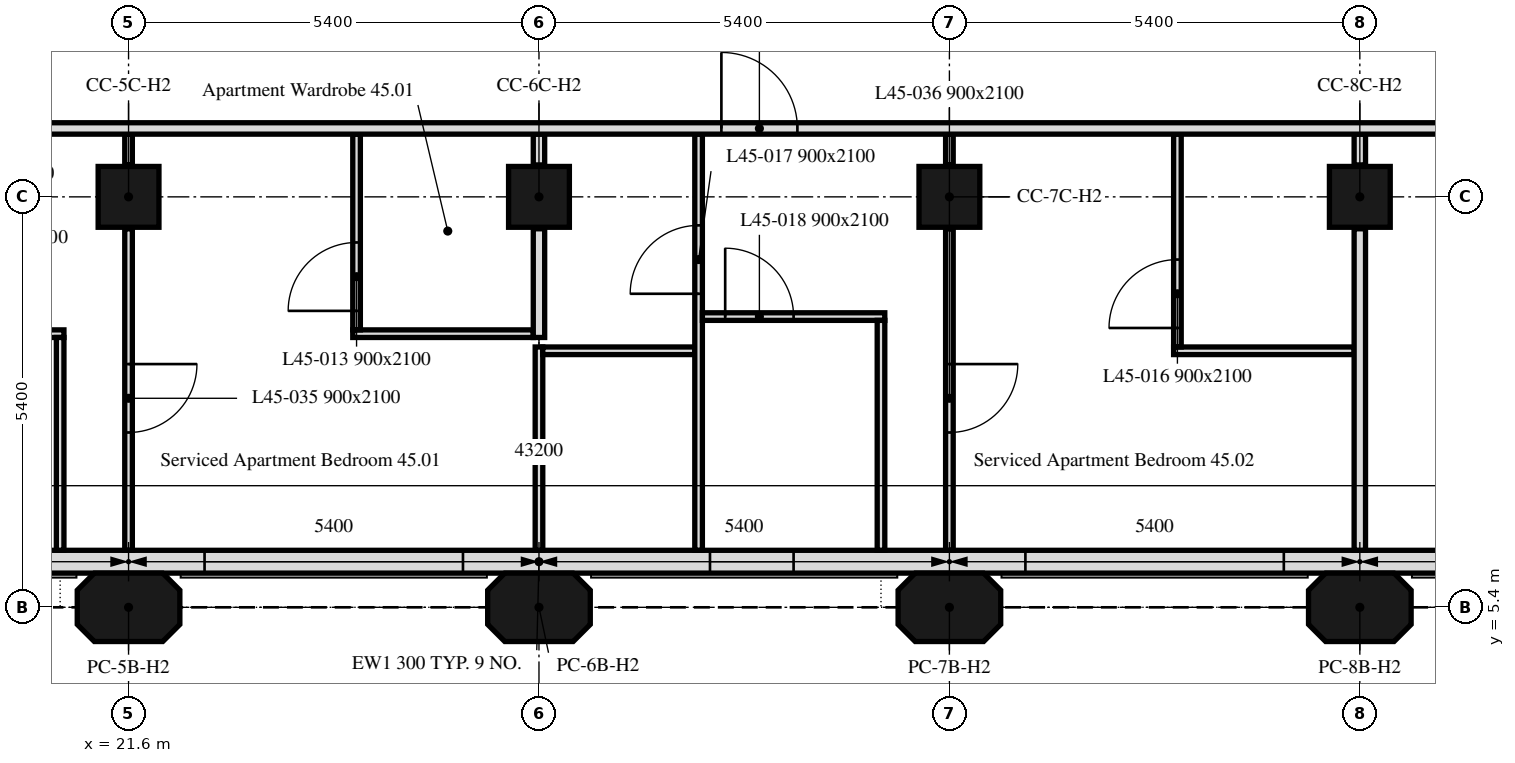
"""IFC4 building model, lengths in metres.
Left out: names, types, materials, properties, quantities, classifications, styles, units other than length and angle.
Written with IfcOpenShell. Run it as: python <this file> out.ifc"""

import sys

from ifc_helpers import new_model, si_unit, direction, frame, frame_2d, origin, origin_2d, place, context, subcontext, project, spatial, polyline, rectangle, outline, extrude, element, fill, save


model = new_model("IFC4")
c1 = context("Model", 3, precision=1e-05, world=origin(), true_north=direction((0.0, 1.0)))
c2 = subcontext(c1, "Body", "Model", "MODEL_VIEW")
j1 = project(units=[si_unit("LENGTHUNIT", "METRE"), si_unit("PLANEANGLEUNIT", "RADIAN")], contexts=[c1])
p1 = place(None, origin())
s1 = spatial("IfcSite", under=j1, at=p1, CompositionType="ELEMENT")
p2 = place(p1, origin())
s2 = spatial("IfcBuilding", under=s1, at=p2, CompositionType="ELEMENT")
p3 = place(p2, frame((0.0, 0.0, 187.3)))
s3 = spatial("IfcBuildingStorey", under=s2, at=p3, CompositionType="ELEMENT", Elevation=187.3)
for number, where, z_axis, x_axis in (
    (1, (21.6, 5.4, 0.0), (0.0, 0.0, 1.0), (1.0, 0.0, 0.0)),
    (2, (27.0, 5.4, 0.0), (0.0, 0.0, 1.0), (1.0, 0.0, 0.0)),
    (3, (32.4, 5.4, 0.0), (0.0, 0.0, 1.0), (1.0, 0.0, 0.0)),
    (4, (37.8, 5.4, 0.0), (0.0, 0.0, 1.0), (1.0, 0.0, 0.0)),
):
    element("IfcColumn", number, at=place(p3, frame(where, z_axis=z_axis, x_axis=x_axis)), inside=s3, PredefinedType="COLUMN", context=c2, shape_type="SweptSolid", body=[
        extrude(outline(polyline([(-0.45, -0.45), (0.45, -0.45), (0.675, -0.225), (0.675, 0.225), (0.45, 0.45), (-0.45, 0.45), (-0.675, 0.225), (-0.675, -0.225), (-0.45, -0.45)])), origin(), (0.0, 0.0, 1.0), 3.0),
    ])
for number, where, z_axis, x_axis in (
    (5, (21.6, 10.8, 0.0), (0.0, 0.0, 1.0), (1.0, 0.0, 0.0)),
    (6, (27.0, 10.8, 0.0), (0.0, 0.0, 1.0), (1.0, 0.0, 0.0)),
    (7, (32.4, 10.8, 0.0), (0.0, 0.0, 1.0), (1.0, 0.0, 0.0)),
    (8, (37.8, 10.8, 0.0), (0.0, 0.0, 1.0), (1.0, 0.0, 0.0)),
):
    element("IfcColumn", number, at=place(p3, frame(where, z_axis=z_axis, x_axis=x_axis)), inside=s3, PredefinedType="COLUMN", context=c2, shape_type="SweptSolid", body=[
        extrude(rectangle(XDim=0.8, YDim=0.8, at=origin_2d()), origin(), (0.0, 0.0, 1.0), 3.0),
    ])
p4 = place(p3, frame((10.986, 6.0, 0.0), z_axis=(0.0, 0.0, 1.0), x_axis=(1.0, 0.0, 0.0)))
e9 = element("IfcWall", 9, at=p4, inside=s3, PredefinedType="SOLIDWALL", context=c2, shape_type="SweptSolid", body=[
    extrude(rectangle(XDim=32.027, YDim=0.3, at=frame_2d((16.014, 0.0))), origin(), (0.0, 0.0, 1.0), 3.0),
])
p5 = place(p4, frame((0.814, 0.0, 0.9)))
e10 = element("IfcOpeningElement", 10, at=p5, cuts=e9, PredefinedType="OPENING", context=c2, shape_type="SweptSolid", body=[
    extrude(rectangle(XDim=3.4, YDim=1.7, at=frame_2d((1.7, 0.85))), frame((0.0, 0.16, 0.0), z_axis=(0.0, -1.0, 0.0), x_axis=(1.0, 0.0, 0.0)), (0.0, 0.0, 1.0), 0.32),
])
p6 = place(p4, frame((7.464, 0.0, 0.9)))
e11 = element("IfcOpeningElement", 11, at=p6, cuts=e9, PredefinedType="OPENING", context=c2, shape_type="SweptSolid", body=[
    extrude(rectangle(XDim=1.1, YDim=1.7, at=frame_2d((0.55, 0.85))), frame((0.0, 0.16, 0.0), z_axis=(0.0, -1.0, 0.0), x_axis=(1.0, 0.0, 0.0)), (0.0, 0.0, 1.0), 0.32),
])
p7 = place(p4, frame((11.614, 0.0, 0.9)))
e12 = element("IfcOpeningElement", 12, at=p7, cuts=e9, PredefinedType="OPENING", context=c2, shape_type="SweptSolid", body=[
    extrude(rectangle(XDim=3.4, YDim=1.7, at=frame_2d((1.7, 0.85))), frame((0.0, 0.16, 0.0), z_axis=(0.0, -1.0, 0.0), x_axis=(1.0, 0.0, 0.0)), (0.0, 0.0, 1.0), 0.32),
])
p8 = place(p4, frame((18.264, 0.0, 0.9)))
e13 = element("IfcOpeningElement", 13, at=p8, cuts=e9, PredefinedType="OPENING", context=c2, shape_type="SweptSolid", body=[
    extrude(rectangle(XDim=1.1, YDim=1.7, at=frame_2d((0.55, 0.85))), frame((0.0, 0.16, 0.0), z_axis=(0.0, -1.0, 0.0), x_axis=(1.0, 0.0, 0.0)), (0.0, 0.0, 1.0), 0.32),
])
p9 = place(p4, frame((22.414, 0.0, 0.9)))
e14 = element("IfcOpeningElement", 14, at=p9, cuts=e9, PredefinedType="OPENING", context=c2, shape_type="SweptSolid", body=[
    extrude(rectangle(XDim=3.4, YDim=1.7, at=frame_2d((1.7, 0.85))), frame((0.0, 0.16, 0.0), z_axis=(0.0, -1.0, 0.0), x_axis=(1.0, 0.0, 0.0)), (0.0, 0.0, 1.0), 0.32),
])
p10 = place(p4, frame((28.164, 0.0, 0.9)))
e15 = element("IfcOpeningElement", 15, at=p10, cuts=e9, PredefinedType="OPENING", context=c2, shape_type="SweptSolid", body=[
    extrude(rectangle(XDim=1.1, YDim=1.7, at=frame_2d((0.55, 0.85))), frame((0.0, 0.16, 0.0), z_axis=(0.0, -1.0, 0.0), x_axis=(1.0, 0.0, 0.0)), (0.0, 0.0, 1.0), 0.32),
])
p11 = place(p3, frame((27.0, 6.151, 0.0), z_axis=(0.0, 0.0, 1.0), x_axis=(0.0, 1.0, 0.0)))
e16 = element("IfcWall", 16, at=p11, inside=s3, PredefinedType="PARTITIONING", context=c2, shape_type="SweptSolid", body=[
    extrude(rectangle(XDim=2.674, YDim=0.1, at=frame_2d((1.337, 0.0))), origin(), (0.0, 0.0, 1.0), 3.0),
])
p12 = place(p3, frame((26.925, 9.0, 0.0), z_axis=(0.0, 0.0, 1.0), x_axis=(-1.0, 0.0, 0.0)))
e17 = element("IfcWall", 17, at=p12, inside=s3, PredefinedType="PARTITIONING", context=c2, shape_type="SweptSolid", body=[
    extrude(rectangle(XDim=2.375, YDim=0.1, at=frame_2d((1.188, 0.0))), origin(), (0.0, 0.0, 1.0), 3.0),
])
p13 = place(p3, frame((24.6, 9.05, 0.0), z_axis=(0.0, 0.0, 1.0), x_axis=(0.0, 1.0, 0.0)))
e18 = element("IfcWall", 18, at=p13, inside=s3, PredefinedType="PARTITIONING", context=c2, shape_type="SweptSolid", body=[
    extrude(rectangle(XDim=2.575, YDim=0.1, at=frame_2d((1.288, 0.0))), origin(), (0.0, 0.0, 1.0), 3.0),
])
p14 = place(p13, frame((0.25, 0.0, 0.0)))
e19 = element("IfcOpeningElement", 19, at=p14, cuts=e18, PredefinedType="OPENING", context=c2, shape_type="SweptSolid", body=[
    extrude(rectangle(XDim=0.9, YDim=2.1, at=frame_2d((0.45, 1.05))), frame((0.0, 0.05, 0.0), z_axis=(0.0, -1.0, 0.0), x_axis=(1.0, 0.0, 0.0)), (0.0, 0.0, 1.0), 0.1),
])
p15 = place(p3, frame((21.6, 11.625, 0.0), z_axis=(0.0, 0.0, 1.0), x_axis=(0.0, -1.0, 0.0)))
e20 = element("IfcWall", 20, at=p15, inside=s3, PredefinedType="PARTITIONING", context=c2, shape_type="SweptSolid", body=[
    extrude(rectangle(XDim=0.405, YDim=0.1, at=frame_2d((0.203, 0.0))), origin(), (0.0, 0.0, 1.0), 3.0),
])
p16 = place(p3, frame((21.6, 10.38, 0.0), z_axis=(0.0, 0.0, 1.0), x_axis=(0.0, -1.0, 0.0)))
e21 = element("IfcWall", 21, at=p16, inside=s3, PredefinedType="PARTITIONING", context=c2, shape_type="SweptSolid", body=[
    extrude(rectangle(XDim=4.229, YDim=0.1, at=frame_2d((2.115, 0.0))), origin(), (0.0, 0.0, 1.0), 3.0),
])
p17 = place(p16, frame((1.78, 0.0, 0.0)))
e22 = element("IfcOpeningElement", 22, at=p17, cuts=e21, PredefinedType="OPENING", context=c2, shape_type="SweptSolid", body=[
    extrude(rectangle(XDim=0.9, YDim=2.1, at=frame_2d((0.45, 1.05))), frame((0.0, 0.05, 0.0), z_axis=(0.0, -1.0, 0.0), x_axis=(1.0, 0.0, 0.0)), (0.0, 0.0, 1.0), 0.1),
])
p18 = place(p3, frame((16.275, 9.0, 0.0), z_axis=(0.0, 0.0, 1.0), x_axis=(1.0, 0.0, 0.0)))
e23 = element("IfcWall", 23, at=p18, inside=s3, PredefinedType="PARTITIONING", context=c2, shape_type="SweptSolid", body=[
    extrude(rectangle(XDim=4.475, YDim=0.1, at=frame_2d((2.238, 0.0))), origin(), (0.0, 0.0, 1.0), 3.0),
])
p19 = place(p18, frame((2.375, 0.0, 0.0)))
e24 = element("IfcOpeningElement", 24, at=p19, cuts=e23, PredefinedType="OPENING", context=c2, shape_type="SweptSolid", body=[
    extrude(rectangle(XDim=0.9, YDim=2.1, at=frame_2d((0.45, 1.05))), frame((0.0, 0.05, 0.0), z_axis=(0.0, -1.0, 0.0), x_axis=(1.0, 0.0, 0.0)), (0.0, 0.0, 1.0), 0.1),
])
p20 = place(p3, frame((20.7, 8.95, 0.0), z_axis=(0.0, 0.0, 1.0), x_axis=(0.0, -1.0, 0.0)))
e25 = element("IfcWall", 25, at=p20, inside=s3, PredefinedType="PARTITIONING", context=c2, shape_type="SweptSolid", body=[
    extrude(rectangle(XDim=2.799, YDim=0.1, at=frame_2d((1.399, 0.0))), origin(), (0.0, 0.0, 1.0), 3.0),
])
p21 = place(p3, frame((27.0, 8.95, 0.0), z_axis=(0.0, 0.0, 1.0), x_axis=(0.0, 1.0, 0.0)))
e26 = element("IfcWall", 26, at=p21, inside=s3, PredefinedType="PARTITIONING", context=c2, shape_type="SweptSolid", body=[
    extrude(rectangle(XDim=1.43, YDim=0.15, at=frame_2d((0.715, 0.0))), origin(), (0.0, 0.0, 1.0), 3.0),
])
p22 = place(p3, frame((27.0, 11.22, 0.0), z_axis=(0.0, 0.0, 1.0), x_axis=(0.0, 1.0, 0.0)))
e27 = element("IfcWall", 27, at=p22, inside=s3, PredefinedType="PARTITIONING", context=c2, shape_type="SweptSolid", body=[
    extrude(rectangle(XDim=0.405, YDim=0.15, at=frame_2d((0.203, 0.0))), origin(), (0.0, 0.0, 1.0), 3.0),
])
p23 = place(p3, frame((37.725, 8.775, 0.0), z_axis=(0.0, 0.0, 1.0), x_axis=(-1.0, 0.0, 0.0)))
e28 = element("IfcWall", 28, at=p23, inside=s3, PredefinedType="PARTITIONING", context=c2, shape_type="SweptSolid", body=[
    extrude(rectangle(XDim=2.375, YDim=0.1, at=frame_2d((1.188, 0.0))), origin(), (0.0, 0.0, 1.0), 3.0),
])
p24 = place(p3, frame((35.4, 8.825, 0.0), z_axis=(0.0, 0.0, 1.0), x_axis=(0.0, 1.0, 0.0)))
e29 = element("IfcWall", 29, at=p24, inside=s3, PredefinedType="PARTITIONING", context=c2, shape_type="SweptSolid", body=[
    extrude(rectangle(XDim=2.8, YDim=0.1, at=frame_2d((1.4, 0.0))), origin(), (0.0, 0.0, 1.0), 3.0),
])
p25 = place(p24, frame((0.25, 0.0, 0.0)))
e30 = element("IfcOpeningElement", 30, at=p25, cuts=e29, PredefinedType="OPENING", context=c2, shape_type="SweptSolid", body=[
    extrude(rectangle(XDim=0.9, YDim=2.1, at=frame_2d((0.45, 1.05))), frame((0.0, 0.05, 0.0), z_axis=(0.0, -1.0, 0.0), x_axis=(1.0, 0.0, 0.0)), (0.0, 0.0, 1.0), 0.1),
])
p26 = place(p3, frame((32.4, 11.625, 0.0), z_axis=(0.0, 0.0, 1.0), x_axis=(0.0, -1.0, 0.0)))
e31 = element("IfcWall", 31, at=p26, inside=s3, PredefinedType="PARTITIONING", context=c2, shape_type="SweptSolid", body=[
    extrude(rectangle(XDim=0.405, YDim=0.1, at=frame_2d((0.203, 0.0))), origin(), (0.0, 0.0, 1.0), 3.0),
])
p27 = place(p3, frame((32.4, 10.38, 0.0), z_axis=(0.0, 0.0, 1.0), x_axis=(0.0, -1.0, 0.0)))
e32 = element("IfcWall", 32, at=p27, inside=s3, PredefinedType="PARTITIONING", context=c2, shape_type="SweptSolid", body=[
    extrude(rectangle(XDim=4.229, YDim=0.1, at=frame_2d((2.115, 0.0))), origin(), (0.0, 0.0, 1.0), 3.0),
])
p28 = place(p27, frame((1.78, 0.0, 0.0)))
e33 = element("IfcOpeningElement", 33, at=p28, cuts=e32, PredefinedType="OPENING", context=c2, shape_type="SweptSolid", body=[
    extrude(rectangle(XDim=0.9, YDim=2.1, at=frame_2d((0.45, 1.05))), frame((0.0, 0.05, 0.0), z_axis=(0.0, -1.0, 0.0), x_axis=(1.0, 0.0, 0.0)), (0.0, 0.0, 1.0), 0.1),
])
p29 = place(p3, frame((27.05, 8.775, 0.0), z_axis=(0.0, 0.0, 1.0), x_axis=(1.0, 0.0, 0.0)))
e34 = element("IfcWall", 34, at=p29, inside=s3, PredefinedType="PARTITIONING", context=c2, shape_type="SweptSolid", body=[
    extrude(rectangle(XDim=2.0, YDim=0.1, at=frame_2d((1.0, 0.0))), origin(), (0.0, 0.0, 1.0), 3.0),
])
p30 = place(p3, frame((29.1, 6.151, 0.0), z_axis=(0.0, 0.0, 1.0), x_axis=(0.0, 1.0, 0.0)))
e35 = element("IfcWall", 35, at=p30, inside=s3, PredefinedType="PARTITIONING", context=c2, shape_type="SweptSolid", body=[
    extrude(rectangle(XDim=5.474, YDim=0.1, at=frame_2d((2.737, 0.0))), origin(), (0.0, 0.0, 1.0), 3.0),
])
p31 = place(p30, frame((3.374, 0.0, 0.0)))
e36 = element("IfcOpeningElement", 36, at=p31, cuts=e35, PredefinedType="OPENING", context=c2, shape_type="SweptSolid", body=[
    extrude(rectangle(XDim=0.9, YDim=2.1, at=frame_2d((0.45, 1.05))), frame((0.0, 0.05, 0.0), z_axis=(0.0, -1.0, 0.0), x_axis=(1.0, 0.0, 0.0)), (0.0, 0.0, 1.0), 0.1),
])
p32 = place(p3, frame((29.15, 9.225, 0.0), z_axis=(0.0, 0.0, 1.0), x_axis=(1.0, 0.0, 0.0)))
e37 = element("IfcWall", 37, at=p32, inside=s3, PredefinedType="PARTITIONING", context=c2, shape_type="SweptSolid", body=[
    extrude(rectangle(XDim=2.4, YDim=0.1, at=frame_2d((1.2, 0.0))), origin(), (0.0, 0.0, 1.0), 3.0),
])
p33 = place(p32, frame((0.3, 0.0, 0.0)))
e38 = element("IfcOpeningElement", 38, at=p33, cuts=e37, PredefinedType="OPENING", context=c2, shape_type="SweptSolid", body=[
    extrude(rectangle(XDim=0.9, YDim=2.1, at=frame_2d((0.45, 1.05))), frame((0.0, 0.05, 0.0), z_axis=(0.0, -1.0, 0.0), x_axis=(1.0, 0.0, 0.0)), (0.0, 0.0, 1.0), 0.1),
])
p34 = place(p3, frame((31.5, 9.175, 0.0), z_axis=(0.0, 0.0, 1.0), x_axis=(0.0, -1.0, 0.0)))
e39 = element("IfcWall", 39, at=p34, inside=s3, PredefinedType="PARTITIONING", context=c2, shape_type="SweptSolid", body=[
    extrude(rectangle(XDim=3.024, YDim=0.1, at=frame_2d((1.512, 0.0))), origin(), (0.0, 0.0, 1.0), 3.0),
])
p35 = place(p3, frame((37.8, 6.151, 0.0), z_axis=(0.0, 0.0, 1.0), x_axis=(0.0, 1.0, 0.0)))
e40 = element("IfcWall", 40, at=p35, inside=s3, PredefinedType="PARTITIONING", context=c2, shape_type="SweptSolid", body=[
    extrude(rectangle(XDim=4.229, YDim=0.15, at=frame_2d((2.115, 0.0))), origin(), (0.0, 0.0, 1.0), 3.0),
])
p36 = place(p3, frame((37.8, 11.22, 0.0), z_axis=(0.0, 0.0, 1.0), x_axis=(0.0, 1.0, 0.0)))
e41 = element("IfcWall", 41, at=p36, inside=s3, PredefinedType="PARTITIONING", context=c2, shape_type="SweptSolid", body=[
    extrude(rectangle(XDim=0.405, YDim=0.15, at=frame_2d((0.203, 0.0))), origin(), (0.0, 0.0, 1.0), 3.0),
])
p37 = place(p3, frame((6.151, 11.7, 0.0), z_axis=(0.0, 0.0, 1.0), x_axis=(1.0, 0.0, 0.0)))
e42 = element("IfcWall", 42, at=p37, inside=s3, PredefinedType="PARTITIONING", context=c2, shape_type="SweptSolid", body=[
    extrude(rectangle(XDim=41.698, YDim=0.15, at=frame_2d((20.849, 0.0))), origin(), (0.0, 0.0, 1.0), 3.0),
])
p38 = place(p37, frame((1.449, 0.0, 0.0)))
e43 = element("IfcOpeningElement", 43, at=p38, cuts=e42, PredefinedType="OPENING", context=c2, shape_type="SweptSolid", body=[
    extrude(rectangle(XDim=1.0, YDim=2.1, at=frame_2d((0.5, 1.05))), frame((0.0, 0.075, 0.0), z_axis=(0.0, -1.0, 0.0), x_axis=(1.0, 0.0, 0.0)), (0.0, 0.0, 1.0), 0.15),
])
p39 = place(p37, frame((37.954, 0.0, 0.0)))
e44 = element("IfcOpeningElement", 44, at=p39, cuts=e42, PredefinedType="OPENING", context=c2, shape_type="SweptSolid", body=[
    extrude(rectangle(XDim=1.0, YDim=2.1, at=frame_2d((0.5, 1.05))), frame((0.0, 0.075, 0.0), z_axis=(0.0, -1.0, 0.0), x_axis=(1.0, 0.0, 0.0)), (0.0, 0.0, 1.0), 0.15),
])
p40 = place(p37, frame((12.449, 0.0, 0.0)))
e45 = element("IfcOpeningElement", 45, at=p40, cuts=e42, PredefinedType="OPENING", context=c2, shape_type="SweptSolid", body=[
    extrude(rectangle(XDim=1.0, YDim=2.1, at=frame_2d((0.5, 1.05))), frame((0.0, 0.075, 0.0), z_axis=(0.0, -1.0, 0.0), x_axis=(1.0, 0.0, 0.0)), (0.0, 0.0, 1.0), 0.15),
])
p41 = place(p37, frame((23.249, 0.0, 0.0)))
e46 = element("IfcOpeningElement", 46, at=p41, cuts=e42, PredefinedType="OPENING", context=c2, shape_type="SweptSolid", body=[
    extrude(rectangle(XDim=1.0, YDim=2.1, at=frame_2d((0.5, 1.05))), frame((0.0, 0.075, 0.0), z_axis=(0.0, -1.0, 0.0), x_axis=(1.0, 0.0, 0.0)), (0.0, 0.0, 1.0), 0.15),
])
p42 = place(p7, origin())
e47 = element("IfcWindow", 47, at=p42, inside=s3, PartitioningType="SINGLE_PANEL", PredefinedType="WINDOW", context=c2, shape_type="SweptSolid", body=[
    extrude(rectangle(XDim=3.4, YDim=1.7, at=frame_2d((1.7, 0.85))), frame((0.0, 0.03, 0.0), z_axis=(0.0, -1.0, 0.0), x_axis=(1.0, 0.0, 0.0)), (0.0, 0.0, 1.0), 0.06),
])
fill(e12, e47)
p43 = place(p8, origin())
e48 = element("IfcWindow", 48, at=p43, inside=s3, PartitioningType="SINGLE_PANEL", PredefinedType="WINDOW", context=c2, shape_type="SweptSolid", body=[
    extrude(rectangle(XDim=1.1, YDim=1.7, at=frame_2d((0.55, 0.85))), frame((0.0, 0.03, 0.0), z_axis=(0.0, -1.0, 0.0), x_axis=(1.0, 0.0, 0.0)), (0.0, 0.0, 1.0), 0.06),
])
fill(e13, e48)
p44 = place(p9, origin())
e49 = element("IfcWindow", 49, at=p44, inside=s3, PartitioningType="SINGLE_PANEL", PredefinedType="WINDOW", context=c2, shape_type="SweptSolid", body=[
    extrude(rectangle(XDim=3.4, YDim=1.7, at=frame_2d((1.7, 0.85))), frame((0.0, 0.03, 0.0), z_axis=(0.0, -1.0, 0.0), x_axis=(1.0, 0.0, 0.0)), (0.0, 0.0, 1.0), 0.06),
])
fill(e14, e49)
p45 = place(p14, origin())
e50 = element("IfcDoor", 50, at=p45, inside=s3, OperationType="SINGLE_SWING_LEFT", PredefinedType="DOOR", context=c2, shape_type="SweptSolid", body=[
    extrude(rectangle(XDim=0.9, YDim=2.1, at=frame_2d((0.45, 1.05))), frame((0.0, 0.025, 0.0), z_axis=(0.0, -1.0, 0.0), x_axis=(1.0, 0.0, 0.0)), (0.0, 0.0, 1.0), 0.05),
])
fill(e19, e50)
p46 = place(p25, origin())
e51 = element("IfcDoor", 51, at=p46, inside=s3, OperationType="SINGLE_SWING_RIGHT", PredefinedType="DOOR", context=c2, shape_type="SweptSolid", body=[
    extrude(rectangle(XDim=0.9, YDim=2.1, at=frame_2d((0.45, 1.05))), frame((0.0, 0.025, 0.0), z_axis=(0.0, -1.0, 0.0), x_axis=(1.0, 0.0, 0.0)), (0.0, 0.0, 1.0), 0.05),
])
fill(e30, e51)
p47 = place(p31, origin())
e52 = element("IfcDoor", 52, at=p47, inside=s3, OperationType="SINGLE_SWING_LEFT", PredefinedType="DOOR", context=c2, shape_type="SweptSolid", body=[
    extrude(rectangle(XDim=0.9, YDim=2.1, at=frame_2d((0.45, 1.05))), frame((0.0, 0.025, 0.0), z_axis=(0.0, -1.0, 0.0), x_axis=(1.0, 0.0, 0.0)), (0.0, 0.0, 1.0), 0.05),
])
fill(e36, e52)
p48 = place(p33, origin())
e53 = element("IfcDoor", 53, at=p48, inside=s3, OperationType="SINGLE_SWING_RIGHT", PredefinedType="DOOR", context=c2, shape_type="SweptSolid", body=[
    extrude(rectangle(XDim=0.9, YDim=2.1, at=frame_2d((0.45, 1.05))), frame((0.0, 0.025, 0.0), z_axis=(0.0, -1.0, 0.0), x_axis=(1.0, 0.0, 0.0)), (0.0, 0.0, 1.0), 0.05),
])
fill(e38, e53)
p49 = place(p17, origin())
e54 = element("IfcDoor", 54, at=p49, inside=s3, OperationType="SINGLE_SWING_RIGHT", PredefinedType="DOOR", context=c2, shape_type="SweptSolid", body=[
    extrude(rectangle(XDim=0.9, YDim=2.1, at=frame_2d((0.45, 1.05))), frame((0.0, 0.025, 0.0), z_axis=(0.0, -1.0, 0.0), x_axis=(1.0, 0.0, 0.0)), (0.0, 0.0, 1.0), 0.05),
])
fill(e22, e54)
p50 = place(p28, origin())
e55 = element("IfcDoor", 55, at=p50, inside=s3, OperationType="SINGLE_SWING_LEFT", PredefinedType="DOOR", context=c2, shape_type="SweptSolid", body=[
    extrude(rectangle(XDim=0.9, YDim=2.1, at=frame_2d((0.45, 1.05))), frame((0.0, 0.025, 0.0), z_axis=(0.0, -1.0, 0.0), x_axis=(1.0, 0.0, 0.0)), (0.0, 0.0, 1.0), 0.05),
])
fill(e33, e55)
p51 = place(p41, origin())
e56 = element("IfcDoor", 56, at=p51, inside=s3, OperationType="SINGLE_SWING_RIGHT", PredefinedType="DOOR", context=c2, shape_type="SweptSolid", body=[
    extrude(rectangle(XDim=1.0, YDim=2.1, at=frame_2d((0.5, 1.05))), frame((0.0, 0.025, 0.0), z_axis=(0.0, -1.0, 0.0), x_axis=(1.0, 0.0, 0.0)), (0.0, 0.0, 1.0), 0.05),
])
fill(e46, e56)
save(model, sys.argv[1])
